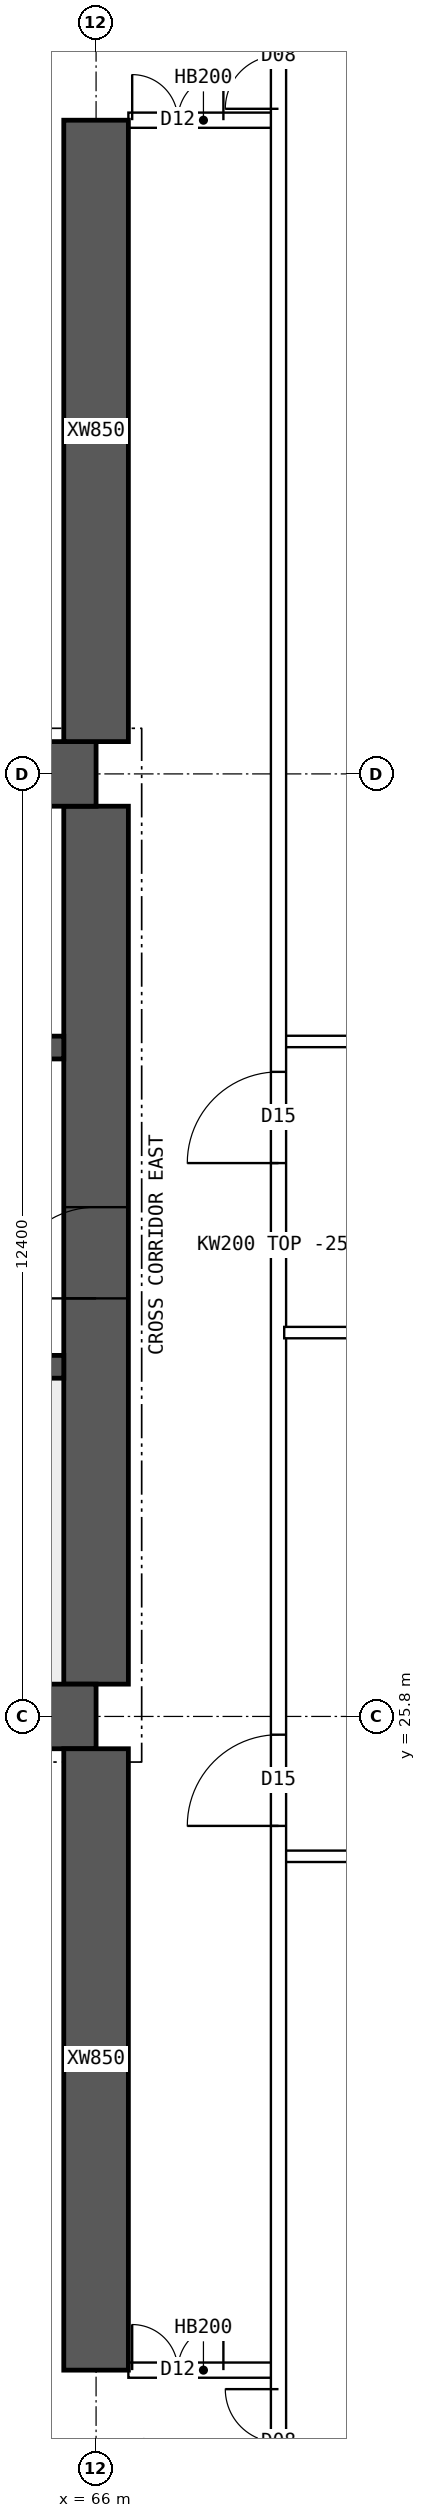
"""IFC4 building model, lengths in metres.
Left out: names, types, materials, properties, quantities, classifications, styles, units other than length and angle.
Written with IfcOpenShell. Run it as: python <this file> out.ifc"""

import sys

from ifc_helpers import new_model, si_unit, direction, frame, frame_2d, origin, place, context, subcontext, project, spatial, polyline, rectangle, outline, extrude, element, fill, save


model = new_model("IFC4")
c1 = context("Model", 3, precision=1e-05, world=origin(), true_north=direction((0.0, 1.0)))
c2 = subcontext(c1, "Body", "Model", "MODEL_VIEW")
j1 = project(units=[si_unit("LENGTHUNIT", "METRE"), si_unit("PLANEANGLEUNIT", "RADIAN")], contexts=[c1])
p1 = place(None, origin())
s1 = spatial("IfcSite", under=j1, at=p1, CompositionType="ELEMENT")
p2 = place(p1, origin())
s2 = spatial("IfcBuilding", under=s1, at=p2, CompositionType="ELEMENT")
p3 = place(p2, frame((0.0, 0.0, 167.35)))
s3 = spatial("IfcBuildingStorey", under=s2, at=p3, CompositionType="ELEMENT", Elevation=167.35)
for number, where, z_axis, x_axis in (
    (1, (18.0, 25.8, 0.0), (0.0, 0.0, 1.0), (1.0, 0.0, 0.0)),
    (2, (18.0, 38.2, 0.0), (0.0, 0.0, 1.0), (1.0, 0.0, 0.0)),
):
    element("IfcWall", number, at=place(p3, frame(where, z_axis=z_axis, x_axis=x_axis)), inside=s3, PredefinedType="SHEAR", context=c2, shape_type="SweptSolid", body=[
        extrude(rectangle(XDim=48.0, YDim=0.85, at=frame_2d((24.0, 0.0))), origin(), (0.0, 0.0, 1.0), 3.75),
    ])
p4 = place(p3, frame((66.0, 26.225, 0.0), z_axis=(0.0, 0.0, 1.0), x_axis=(0.0, 1.0, 0.0)))
e3 = element("IfcWall", 3, at=p4, inside=s3, PredefinedType="SHEAR", context=c2, shape_type="SweptSolid", body=[
    extrude(rectangle(XDim=11.55, YDim=0.85, at=frame_2d((5.775, 0.0))), origin(), (0.0, 0.0, 1.0), 3.75),
])
p5 = place(p4, frame((5.075, 0.0, 0.0)))
e4 = element("IfcOpeningElement", 4, at=p5, cuts=e3, PredefinedType="OPENING", context=c2, shape_type="SweptSolid", body=[
    extrude(rectangle(XDim=1.2, YDim=2.1, at=frame_2d((0.6, 1.05))), frame((0.0, 0.435, 0.0), z_axis=(0.0, -1.0, 0.0), x_axis=(1.0, 0.0, 0.0)), (0.0, 0.0, 1.0), 0.87),
])
p6 = place(p3, frame((18.425, 30.4, 0.0), z_axis=(0.0, 0.0, 1.0), x_axis=(1.0, 0.0, 0.0)))
e5 = element("IfcWall", 5, at=p6, inside=s3, PredefinedType="SHEAR", context=c2, shape_type="SweptSolid", body=[
    extrude(rectangle(XDim=47.15, YDim=0.3, at=frame_2d((23.575, 0.0))), origin(), (0.0, 0.0, 1.0), 3.75),
])
p7 = place(p6, frame((0.4, 0.0, 0.0)))
e6 = element("IfcOpeningElement", 6, at=p7, cuts=e5, PredefinedType="OPENING", context=c2, shape_type="SweptSolid", body=[
    extrude(rectangle(XDim=1.0, YDim=2.1, at=frame_2d((0.5, 1.05))), frame((0.0, 0.16, 0.0), z_axis=(0.0, -1.0, 0.0), x_axis=(1.0, 0.0, 0.0)), (0.0, 0.0, 1.0), 0.32),
])
p8 = place(p6, frame((45.75, 0.0, 0.0)))
e7 = element("IfcOpeningElement", 7, at=p8, cuts=e5, PredefinedType="OPENING", context=c2, shape_type="SweptSolid", body=[
    extrude(rectangle(XDim=1.0, YDim=2.1, at=frame_2d((0.5, 1.05))), frame((0.0, 0.16, 0.0), z_axis=(0.0, -1.0, 0.0), x_axis=(1.0, 0.0, 0.0)), (0.0, 0.0, 1.0), 0.32),
])
p9 = place(p6, frame((8.325, 0.0, 0.0)))
e8 = element("IfcOpeningElement", 8, at=p9, cuts=e5, PredefinedType="OPENING", context=c2, shape_type="SweptSolid", body=[
    extrude(rectangle(XDim=1.1, YDim=2.1, at=frame_2d((0.55, 1.05))), frame((0.0, 0.16, 0.0), z_axis=(0.0, -1.0, 0.0), x_axis=(1.0, 0.0, 0.0)), (0.0, 0.0, 1.0), 0.32),
])
p10 = place(p6, frame((10.925, 0.0, 0.0)))
e9 = element("IfcOpeningElement", 9, at=p10, cuts=e5, PredefinedType="OPENING", context=c2, shape_type="SweptSolid", body=[
    extrude(rectangle(XDim=1.1, YDim=2.1, at=frame_2d((0.55, 1.05))), frame((0.0, 0.16, 0.0), z_axis=(0.0, -1.0, 0.0), x_axis=(1.0, 0.0, 0.0)), (0.0, 0.0, 1.0), 0.32),
])
p11 = place(p6, frame((13.525, 0.0, 0.0)))
e10 = element("IfcOpeningElement", 10, at=p11, cuts=e5, PredefinedType="OPENING", context=c2, shape_type="SweptSolid", body=[
    extrude(rectangle(XDim=1.1, YDim=2.1, at=frame_2d((0.55, 1.05))), frame((0.0, 0.16, 0.0), z_axis=(0.0, -1.0, 0.0), x_axis=(1.0, 0.0, 0.0)), (0.0, 0.0, 1.0), 0.32),
])
p12 = place(p6, frame((16.125, 0.0, 0.0)))
e11 = element("IfcOpeningElement", 11, at=p12, cuts=e5, PredefinedType="OPENING", context=c2, shape_type="SweptSolid", body=[
    extrude(rectangle(XDim=1.1, YDim=2.1, at=frame_2d((0.55, 1.05))), frame((0.0, 0.16, 0.0), z_axis=(0.0, -1.0, 0.0), x_axis=(1.0, 0.0, 0.0)), (0.0, 0.0, 1.0), 0.32),
])
p13 = place(p6, frame((18.9, 0.0, 0.0)))
e12 = element("IfcOpeningElement", 12, at=p13, cuts=e5, PredefinedType="OPENING", context=c2, shape_type="SweptSolid", body=[
    extrude(rectangle(XDim=0.9, YDim=2.1, at=frame_2d((0.45, 1.05))), frame((0.0, 0.16, 0.0), z_axis=(0.0, -1.0, 0.0), x_axis=(1.0, 0.0, 0.0)), (0.0, 0.0, 1.0), 0.32),
])
p14 = place(p6, frame((30.192, 0.0, 0.0)))
e13 = element("IfcOpeningElement", 13, at=p14, cuts=e5, PredefinedType="OPENING", context=c2, shape_type="SweptSolid", body=[
    extrude(rectangle(XDim=1.1, YDim=2.1, at=frame_2d((0.55, 1.05))), frame((0.0, 0.16, 0.0), z_axis=(0.0, -1.0, 0.0), x_axis=(1.0, 0.0, 0.0)), (0.0, 0.0, 1.0), 0.32),
])
p15 = place(p6, frame((33.725, 0.0, 0.0)))
e14 = element("IfcOpeningElement", 14, at=p15, cuts=e5, PredefinedType="OPENING", context=c2, shape_type="SweptSolid", body=[
    extrude(rectangle(XDim=1.1, YDim=2.1, at=frame_2d((0.55, 1.05))), frame((0.0, 0.16, 0.0), z_axis=(0.0, -1.0, 0.0), x_axis=(1.0, 0.0, 0.0)), (0.0, 0.0, 1.0), 0.32),
])
p16 = place(p6, frame((37.258, 0.0, 0.0)))
e15 = element("IfcOpeningElement", 15, at=p16, cuts=e5, PredefinedType="OPENING", context=c2, shape_type="SweptSolid", body=[
    extrude(rectangle(XDim=1.1, YDim=2.1, at=frame_2d((0.55, 1.05))), frame((0.0, 0.16, 0.0), z_axis=(0.0, -1.0, 0.0), x_axis=(1.0, 0.0, 0.0)), (0.0, 0.0, 1.0), 0.32),
])
p17 = place(p3, frame((18.425, 34.6, 0.0), z_axis=(0.0, 0.0, 1.0), x_axis=(1.0, 0.0, 0.0)))
e16 = element("IfcWall", 16, at=p17, inside=s3, PredefinedType="SHEAR", context=c2, shape_type="SweptSolid", body=[
    extrude(rectangle(XDim=47.15, YDim=0.3, at=frame_2d((23.575, 0.0))), origin(), (0.0, 0.0, 1.0), 3.75),
])
p18 = place(p17, frame((0.9, 0.0, 0.0)))
e17 = element("IfcOpeningElement", 17, at=p18, cuts=e16, PredefinedType="OPENING", context=c2, shape_type="SweptSolid", body=[
    extrude(rectangle(XDim=1.1, YDim=2.1, at=frame_2d((0.55, 1.05))), frame((0.0, 0.16, 0.0), z_axis=(0.0, -1.0, 0.0), x_axis=(1.0, 0.0, 0.0)), (0.0, 0.0, 1.0), 0.32),
])
p19 = place(p17, frame((45.15, 0.0, 0.0)))
e18 = element("IfcOpeningElement", 18, at=p19, cuts=e16, PredefinedType="OPENING", context=c2, shape_type="SweptSolid", body=[
    extrude(rectangle(XDim=1.1, YDim=2.1, at=frame_2d((0.55, 1.05))), frame((0.0, 0.16, 0.0), z_axis=(0.0, -1.0, 0.0), x_axis=(1.0, 0.0, 0.0)), (0.0, 0.0, 1.0), 0.32),
])
p20 = place(p17, frame((4.175, 0.0, 0.0)))
e19 = element("IfcOpeningElement", 19, at=p20, cuts=e16, PredefinedType="OPENING", context=c2, shape_type="SweptSolid", body=[
    extrude(rectangle(XDim=0.9, YDim=2.1, at=frame_2d((0.45, 1.05))), frame((0.0, 0.16, 0.0), z_axis=(0.0, -1.0, 0.0), x_axis=(1.0, 0.0, 0.0)), (0.0, 0.0, 1.0), 0.32),
])
p21 = place(p17, frame((42.075, 0.0, 0.0)))
e20 = element("IfcOpeningElement", 20, at=p21, cuts=e16, PredefinedType="OPENING", context=c2, shape_type="SweptSolid", body=[
    extrude(rectangle(XDim=0.9, YDim=2.1, at=frame_2d((0.45, 1.05))), frame((0.0, 0.16, 0.0), z_axis=(0.0, -1.0, 0.0), x_axis=(1.0, 0.0, 0.0)), (0.0, 0.0, 1.0), 0.32),
])
p22 = place(p17, frame((8.95, 0.0, 0.0)))
e21 = element("IfcOpeningElement", 21, at=p22, cuts=e16, PredefinedType="OPENING", context=c2, shape_type="SweptSolid", body=[
    extrude(rectangle(XDim=0.9, YDim=2.1, at=frame_2d((0.45, 1.05))), frame((0.0, 0.16, 0.0), z_axis=(0.0, -1.0, 0.0), x_axis=(1.0, 0.0, 0.0)), (0.0, 0.0, 1.0), 0.32),
])
p23 = place(p17, frame((12.924, 0.0, 0.0)))
e22 = element("IfcOpeningElement", 22, at=p23, cuts=e16, PredefinedType="OPENING", context=c2, shape_type="SweptSolid", body=[
    extrude(rectangle(XDim=0.9, YDim=2.1, at=frame_2d((0.45, 1.05))), frame((0.0, 0.16, 0.0), z_axis=(0.0, -1.0, 0.0), x_axis=(1.0, 0.0, 0.0)), (0.0, 0.0, 1.0), 0.32),
])
p24 = place(p17, frame((16.571, 0.0, 0.0)))
e23 = element("IfcOpeningElement", 23, at=p24, cuts=e16, PredefinedType="OPENING", context=c2, shape_type="SweptSolid", body=[
    extrude(rectangle(XDim=0.9, YDim=2.1, at=frame_2d((0.45, 1.05))), frame((0.0, 0.16, 0.0), z_axis=(0.0, -1.0, 0.0), x_axis=(1.0, 0.0, 0.0)), (0.0, 0.0, 1.0), 0.32),
])
p25 = place(p17, frame((20.33, 0.0, 0.0)))
e24 = element("IfcOpeningElement", 24, at=p25, cuts=e16, PredefinedType="OPENING", context=c2, shape_type="SweptSolid", body=[
    extrude(rectangle(XDim=0.9, YDim=2.1, at=frame_2d((0.45, 1.05))), frame((0.0, 0.16, 0.0), z_axis=(0.0, -1.0, 0.0), x_axis=(1.0, 0.0, 0.0)), (0.0, 0.0, 1.0), 0.32),
])
p26 = place(p17, frame((24.736, 0.0, 0.0)))
e25 = element("IfcOpeningElement", 25, at=p26, cuts=e16, PredefinedType="OPENING", context=c2, shape_type="SweptSolid", body=[
    extrude(rectangle(XDim=0.9, YDim=2.1, at=frame_2d((0.45, 1.05))), frame((0.0, 0.16, 0.0), z_axis=(0.0, -1.0, 0.0), x_axis=(1.0, 0.0, 0.0)), (0.0, 0.0, 1.0), 0.32),
])
p27 = place(p17, frame((27.533, 0.0, 0.0)))
e26 = element("IfcOpeningElement", 26, at=p27, cuts=e16, PredefinedType="OPENING", context=c2, shape_type="SweptSolid", body=[
    extrude(rectangle(XDim=0.9, YDim=2.1, at=frame_2d((0.45, 1.05))), frame((0.0, 0.16, 0.0), z_axis=(0.0, -1.0, 0.0), x_axis=(1.0, 0.0, 0.0)), (0.0, 0.0, 1.0), 0.32),
])
p28 = place(p17, frame((29.906, 0.0, 0.0)))
e27 = element("IfcOpeningElement", 27, at=p28, cuts=e16, PredefinedType="OPENING", context=c2, shape_type="SweptSolid", body=[
    extrude(rectangle(XDim=0.9, YDim=2.1, at=frame_2d((0.45, 1.05))), frame((0.0, 0.16, 0.0), z_axis=(0.0, -1.0, 0.0), x_axis=(1.0, 0.0, 0.0)), (0.0, 0.0, 1.0), 0.32),
])
p29 = place(p17, frame((33.756, 0.0, 0.0)))
e28 = element("IfcOpeningElement", 28, at=p29, cuts=e16, PredefinedType="OPENING", context=c2, shape_type="SweptSolid", body=[
    extrude(rectangle(XDim=0.9, YDim=2.1, at=frame_2d((0.45, 1.05))), frame((0.0, 0.16, 0.0), z_axis=(0.0, -1.0, 0.0), x_axis=(1.0, 0.0, 0.0)), (0.0, 0.0, 1.0), 0.32),
])
p30 = place(p17, frame((37.504, 0.0, 0.0)))
e29 = element("IfcOpeningElement", 29, at=p30, cuts=e16, PredefinedType="OPENING", context=c2, shape_type="SweptSolid", body=[
    extrude(rectangle(XDim=0.9, YDim=2.1, at=frame_2d((0.45, 1.05))), frame((0.0, 0.16, 0.0), z_axis=(0.0, -1.0, 0.0), x_axis=(1.0, 0.0, 0.0)), (0.0, 0.0, 1.0), 0.32),
])
for number, where, z_axis, x_axis in (
    (30, (66.0, 17.2, 0.0), (0.0, 0.0, 1.0), (0.0, 1.0, 0.0)),
    (31, (66.0, 38.625, 0.0), (0.0, 0.0, 1.0), (0.0, 1.0, 0.0)),
):
    element("IfcWall", number, at=place(p3, frame(where, z_axis=z_axis, x_axis=x_axis)), inside=s3, PredefinedType="SHEAR", context=c2, shape_type="SweptSolid", body=[
        extrude(rectangle(XDim=8.175, YDim=0.85, at=frame_2d((4.087, 0.0))), origin(), (0.0, 0.0, 1.0), 3.75),
    ])
p31 = place(p3, frame((66.425, 17.2, 0.0), z_axis=(0.0, 0.0, 1.0), x_axis=(1.0, 0.0, 0.0)))
e32 = element("IfcWall", 32, at=p31, inside=s3, PredefinedType="SOLIDWALL", context=c2, shape_type="SweptSolid", body=[
    extrude(rectangle(XDim=1.975, YDim=0.2, at=frame_2d((0.987, 0.0))), origin(), (0.0, 0.0, 1.0), 3.5),
])
p32 = place(p31, frame((0.05, 0.0, 0.0)))
e33 = element("IfcOpeningElement", 33, at=p32, cuts=e32, PredefinedType="OPENING", context=c2, shape_type="SweptSolid", body=[
    extrude(rectangle(XDim=1.2, YDim=2.1, at=frame_2d((0.6, 1.05))), frame((0.0, 0.11, 0.0), z_axis=(0.0, -1.0, 0.0), x_axis=(1.0, 0.0, 0.0)), (0.0, 0.0, 1.0), 0.22),
])
p33 = place(p3, frame((66.425, 46.8, 0.0), z_axis=(0.0, 0.0, 1.0), x_axis=(1.0, 0.0, 0.0)))
e34 = element("IfcWall", 34, at=p33, inside=s3, PredefinedType="SOLIDWALL", context=c2, shape_type="SweptSolid", body=[
    extrude(rectangle(XDim=1.975, YDim=0.2, at=frame_2d((0.987, 0.0))), origin(), (0.0, 0.0, 1.0), 3.5),
])
p34 = place(p33, frame((0.05, 0.0, 0.0)))
e35 = element("IfcOpeningElement", 35, at=p34, cuts=e34, PredefinedType="OPENING", context=c2, shape_type="SweptSolid", body=[
    extrude(rectangle(XDim=1.2, YDim=2.1, at=frame_2d((0.6, 1.05))), frame((0.0, 0.11, 0.0), z_axis=(0.0, -1.0, 0.0), x_axis=(1.0, 0.0, 0.0)), (0.0, 0.0, 1.0), 0.22),
])
p35 = place(p3, frame((68.475, 30.85, 0.0), z_axis=(0.0, 0.0, 1.0), x_axis=(1.0, 0.0, 0.0)))
e36 = element("IfcWall", 36, at=p35, inside=s3, PredefinedType="PARTITIONING", context=c2, shape_type="SweptSolid", body=[
    extrude(outline(polyline([(0.0, 0.0), (6.82, 0.0), (6.82, 3.5), (3.827, 3.5), (3.825, 3.05), (3.227, 3.05), (3.225, 3.5), (0.0, 3.5), (0.0, 0.0)])), frame((0.0, 0.075, 0.0), z_axis=(0.0, -1.0, 0.0), x_axis=(1.0, 0.0, 0.0)), (0.0, 0.0, 1.0), 0.15),
])
p36 = place(p3, frame((68.4, 10.446, 0.0), z_axis=(0.0, 0.0, 1.0), x_axis=(0.0, 1.0, 0.0)))
e37 = element("IfcWall", 37, at=p36, inside=s3, PredefinedType="SOLIDWALL", context=c2, shape_type="SweptSolid", body=[
    extrude(rectangle(XDim=43.107, YDim=0.2, at=frame_2d((21.554, 0.0))), origin(), (0.0, 0.0, 1.0), 3.5),
])
p37 = place(p36, frame((13.914, 0.0, 0.0)))
e38 = element("IfcOpeningElement", 38, at=p37, cuts=e37, PredefinedType="OPENING", context=c2, shape_type="SweptSolid", body=[
    extrude(rectangle(XDim=1.2, YDim=2.1, at=frame_2d((0.6, 1.05))), frame((0.0, 0.11, 0.0), z_axis=(0.0, -1.0, 0.0), x_axis=(1.0, 0.0, 0.0)), (0.0, 0.0, 1.0), 0.22),
])
p38 = place(p36, frame((22.634, 0.0, 0.0)))
e39 = element("IfcOpeningElement", 39, at=p38, cuts=e37, PredefinedType="OPENING", context=c2, shape_type="SweptSolid", body=[
    extrude(rectangle(XDim=1.2, YDim=2.1, at=frame_2d((0.6, 1.05))), frame((0.0, 0.11, 0.0), z_axis=(0.0, -1.0, 0.0), x_axis=(1.0, 0.0, 0.0)), (0.0, 0.0, 1.0), 0.22),
])
p39 = place(p36, frame((5.104, 0.0, 0.0)))
e40 = element("IfcOpeningElement", 40, at=p39, cuts=e37, PredefinedType="OPENING", context=c2, shape_type="SweptSolid", body=[
    extrude(rectangle(XDim=1.4, YDim=2.1, at=frame_2d((0.7, 1.05))), frame((0.0, 0.11, 0.0), z_axis=(0.0, -1.0, 0.0), x_axis=(1.0, 0.0, 0.0)), (0.0, 0.0, 1.0), 0.22),
])
p40 = place(p36, frame((36.504, 0.0, 0.0)))
e41 = element("IfcOpeningElement", 41, at=p40, cuts=e37, PredefinedType="OPENING", context=c2, shape_type="SweptSolid", body=[
    extrude(rectangle(XDim=1.4, YDim=2.1, at=frame_2d((0.7, 1.05))), frame((0.0, 0.11, 0.0), z_axis=(0.0, -1.0, 0.0), x_axis=(1.0, 0.0, 0.0)), (0.0, 0.0, 1.0), 0.22),
])
p41 = place(p3, frame((68.475, 23.96, 0.0), z_axis=(0.0, 0.0, 1.0), x_axis=(1.0, 0.0, 0.0)))
e42 = element("IfcWall", 42, at=p41, inside=s3, PredefinedType="PARTITIONING", context=c2, shape_type="SweptSolid", body=[
    extrude(rectangle(XDim=6.82, YDim=0.15, at=frame_2d((3.41, 0.0))), origin(), (0.0, 0.0, 1.0), 3.5),
])
p42 = place(p3, frame((68.475, 34.68, 0.0), z_axis=(0.0, 0.0, 1.0), x_axis=(1.0, 0.0, 0.0)))
e43 = element("IfcWall", 43, at=p42, inside=s3, PredefinedType="PARTITIONING", context=c2, shape_type="SweptSolid", body=[
    extrude(outline(polyline([(0.0, 0.0), (6.82, 0.0), (6.82, 3.5), (3.827, 3.5), (3.825, 3.05), (3.227, 3.05), (3.225, 3.5), (0.0, 3.5), (0.0, 0.0)])), frame((0.0, 0.075, 0.0), z_axis=(0.0, -1.0, 0.0), x_axis=(1.0, 0.0, 0.0)), (0.0, 0.0, 1.0), 0.15),
])
p43 = place(p5, origin())
e44 = element("IfcDoor", 44, at=p43, inside=s3, OperationType="SINGLE_SWING_LEFT", PredefinedType="DOOR", context=c2, shape_type="SweptSolid", body=[
    extrude(rectangle(XDim=1.2, YDim=2.1, at=frame_2d((0.6, 1.05))), frame((0.0, 0.025, 0.0), z_axis=(0.0, -1.0, 0.0), x_axis=(1.0, 0.0, 0.0)), (0.0, 0.0, 1.0), 0.05),
])
fill(e4, e44)
p44 = place(p32, origin())
e45 = element("IfcDoor", 45, at=p44, inside=s3, OperationType="DOUBLE_DOOR_SINGLE_SWING", PredefinedType="DOOR", context=c2, shape_type="SweptSolid", body=[
    extrude(rectangle(XDim=1.2, YDim=2.1, at=frame_2d((0.6, 1.05))), frame((0.0, 0.025, 0.0), z_axis=(0.0, -1.0, 0.0), x_axis=(1.0, 0.0, 0.0)), (0.0, 0.0, 1.0), 0.05),
])
fill(e33, e45)
p45 = place(p34, origin())
e46 = element("IfcDoor", 46, at=p45, inside=s3, OperationType="DOUBLE_DOOR_SINGLE_SWING", PredefinedType="DOOR", context=c2, shape_type="SweptSolid", body=[
    extrude(rectangle(XDim=1.2, YDim=2.1, at=frame_2d((0.6, 1.05))), frame((0.0, 0.025, 0.0), z_axis=(0.0, -1.0, 0.0), x_axis=(1.0, 0.0, 0.0)), (0.0, 0.0, 1.0), 0.05),
])
fill(e35, e46)
p46 = place(p37, origin())
e47 = element("IfcDoor", 47, at=p46, inside=s3, OperationType="SINGLE_SWING_LEFT", PredefinedType="DOOR", context=c2, shape_type="SweptSolid", body=[
    extrude(rectangle(XDim=1.2, YDim=2.1, at=frame_2d((0.6, 1.05))), frame((0.0, 0.025, 0.0), z_axis=(0.0, -1.0, 0.0), x_axis=(1.0, 0.0, 0.0)), (0.0, 0.0, 1.0), 0.05),
])
fill(e38, e47)
p47 = place(p38, origin())
e48 = element("IfcDoor", 48, at=p47, inside=s3, OperationType="SINGLE_SWING_LEFT", PredefinedType="DOOR", context=c2, shape_type="SweptSolid", body=[
    extrude(rectangle(XDim=1.2, YDim=2.1, at=frame_2d((0.6, 1.05))), frame((0.0, 0.025, 0.0), z_axis=(0.0, -1.0, 0.0), x_axis=(1.0, 0.0, 0.0)), (0.0, 0.0, 1.0), 0.05),
])
fill(e39, e48)
p48 = place(p39, origin())
e49 = element("IfcDoor", 49, at=p48, inside=s3, OperationType="DOUBLE_DOOR_SINGLE_SWING", PredefinedType="DOOR", context=c2, shape_type="SweptSolid", body=[
    extrude(rectangle(XDim=1.4, YDim=2.1, at=frame_2d((0.7, 1.05))), frame((0.0, 0.025, 0.0), z_axis=(0.0, -1.0, 0.0), x_axis=(1.0, 0.0, 0.0)), (0.0, 0.0, 1.0), 0.05),
])
fill(e40, e49)
p49 = place(p40, origin())
e50 = element("IfcDoor", 50, at=p49, inside=s3, OperationType="DOUBLE_DOOR_SINGLE_SWING", PredefinedType="DOOR", context=c2, shape_type="SweptSolid", body=[
    extrude(rectangle(XDim=1.4, YDim=2.1, at=frame_2d((0.7, 1.05))), frame((0.0, 0.025, 0.0), z_axis=(0.0, -1.0, 0.0), x_axis=(1.0, 0.0, 0.0)), (0.0, 0.0, 1.0), 0.05),
])
fill(e41, e50)
save(model, sys.argv[1])
